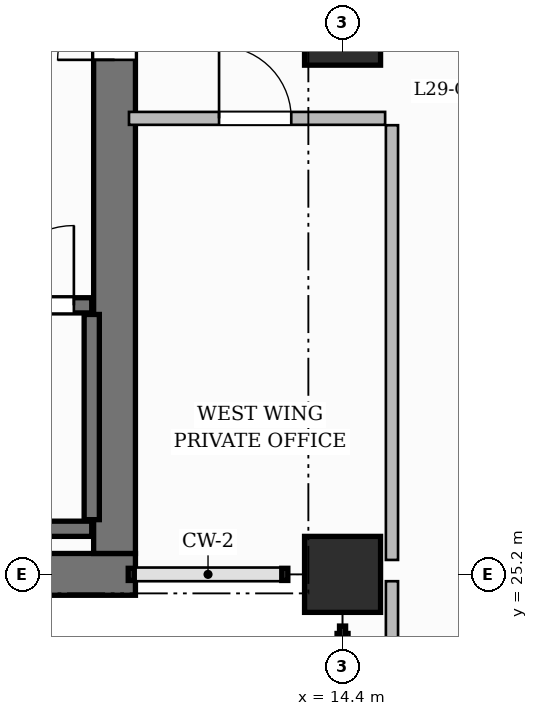
"""IFC4 building model, lengths in metres.
Left out: names, types, materials, properties, quantities, classifications, styles, units other than length and angle.
Written with IfcOpenShell. Run it as: python <this file> out.ifc"""

import sys

from ifc_helpers import new_model, si_unit, direction, frame, frame_2d, origin, origin_2d, place, context, subcontext, project, spatial, rectangle, extrude, source, transform, mapped, element, fill, save


model = new_model("IFC4")
c1 = context("Model", 3, precision=1e-05, world=origin(), true_north=direction((0.0, 1.0)))
c2 = subcontext(c1, "Body", "Model", "MODEL_VIEW")
j1 = project(units=[si_unit("LENGTHUNIT", "METRE"), si_unit("PLANEANGLEUNIT", "RADIAN")], contexts=[c1])
p1 = place(None, origin())
s1 = spatial("IfcSite", under=j1, at=p1, CompositionType="ELEMENT")
p2 = place(p1, origin())
s2 = spatial("IfcBuilding", under=s1, at=p2, CompositionType="ELEMENT")
p3 = place(p2, frame((0.0, 0.0, 119.2)))
s3 = spatial("IfcBuildingStorey", under=s2, at=p3, CompositionType="ELEMENT", Elevation=119.2)
p4 = place(p3, frame((3.325, 25.2, 0.0), z_axis=(0.0, 0.0, 1.0), x_axis=(1.0, 0.0, 0.0)))
e1 = element("IfcWall", 1, at=p4, inside=s3, PredefinedType="SHEAR", context=c2, shape_type="SweptSolid", body=[
    extrude(rectangle(XDim=8.35, YDim=0.55, at=frame_2d((4.175, 0.0))), origin(), (0.0, 0.0, 1.0), 3.7),
])
p5 = place(p3, frame((11.4, 25.475, 0.0), z_axis=(0.0, 0.0, 1.0), x_axis=(0.0, 1.0, 0.0)))
e2 = element("IfcWall", 2, at=p5, inside=s3, PredefinedType="SHEAR", context=c2, shape_type="SweptSolid", body=[
    extrude(rectangle(XDim=13.85, YDim=0.55, at=frame_2d((6.925, 0.0))), origin(), (0.0, 0.0, 1.0), 3.7),
])
p6 = place(p5, frame((6.495, 0.0, 0.0)))
e3 = element("IfcOpeningElement", 3, at=p6, cuts=e2, PredefinedType="OPENING", context=c2, shape_type="SweptSolid", body=[
    extrude(rectangle(XDim=1.5, YDim=2.2, at=frame_2d((0.75, 1.1))), frame((0.0, 0.285, 0.0), z_axis=(0.0, -1.0, 0.0), x_axis=(1.0, 0.0, 0.0)), (0.0, 0.0, 1.0), 0.57),
])
m1 = source(origin(), c2, "Body", "SweptSolid", [
    extrude(rectangle(XDim=1.0, YDim=1.0, at=origin_2d()), origin(), (0.0, 0.0, 1.0), 3.7),
])
for number, where, z_axis, x_axis in (
    (4, (14.4, 25.2, 0.0), (0.0, 0.0, 1.0), (1.0, 0.0, 0.0)),
    (5, (14.4, 32.4, 0.0), (0.0, 0.0, 1.0), (1.0, 0.0, 0.0)),
):
    element("IfcColumn", number, at=place(p3, frame(where, z_axis=z_axis, x_axis=x_axis)), inside=s3, PredefinedType="COLUMN", context=c2, shape_type="MappedRepresentation", body=[
        mapped(m1, transform((0.0, 0.0, 0.0), scale=1.0)),
    ])
p7 = place(p3, frame((4.0, 25.8, 0.0), z_axis=(0.0, 0.0, 1.0), x_axis=(1.0, 0.0, 0.0)))
e6 = element("IfcWall", 6, at=p7, inside=s3, PredefinedType="SHEAR", context=c2, shape_type="SweptSolid", body=[
    extrude(rectangle(XDim=7.1, YDim=0.2, at=frame_2d((3.55, 0.0))), origin(), (0.0, 0.0, 1.0), 3.7),
])
p8 = place(p3, frame((11.1, 25.92, 0.0), z_axis=(0.0, 0.0, 1.0), x_axis=(0.0, 1.0, 0.0)))
e7 = element("IfcWall", 7, at=p8, inside=s3, PredefinedType="SHEAR", context=c2, shape_type="SweptSolid", body=[
    extrude(rectangle(XDim=2.7, YDim=0.2, at=frame_2d((1.35, 0.0))), origin(), (0.0, 0.0, 1.0), 3.7),
])
p9 = place(p3, frame((4.0, 28.74, 0.0), z_axis=(0.0, 0.0, 1.0), x_axis=(1.0, 0.0, 0.0)))
e8 = element("IfcWall", 8, at=p9, inside=s3, PredefinedType="SHEAR", context=c2, shape_type="SweptSolid", body=[
    extrude(rectangle(XDim=7.1, YDim=0.2, at=frame_2d((3.55, 0.0))), origin(), (0.0, 0.0, 1.0), 3.7),
])
p10 = place(p9, frame((5.815, 0.0, 0.0)))
e9 = element("IfcOpeningElement", 9, at=p10, cuts=e8, PredefinedType="OPENING", context=c2, shape_type="SweptSolid", body=[
    extrude(rectangle(XDim=1.05, YDim=2.2, at=frame_2d((0.525, 1.1))), frame((0.0, 0.11, 0.0), z_axis=(0.0, -1.0, 0.0), x_axis=(1.0, 0.0, 0.0)), (0.0, 0.0, 1.0), 0.22),
])
p11 = place(p3, frame((15.05, 12.36, 0.0), z_axis=(0.0, 0.0, 1.0), x_axis=(0.0, 1.0, 0.0)))
e10 = element("IfcWall", 10, at=p11, inside=s3, PredefinedType="PARTITIONING", context=c2, shape_type="SweptSolid", body=[
    extrude(rectangle(XDim=12.75, YDim=0.16, at=frame_2d((6.375, 0.0))), origin(), (0.0, 0.0, 1.0), 3.45),
])
p12 = place(p3, frame((15.05, 25.39, 0.0), z_axis=(0.0, 0.0, 1.0), x_axis=(0.0, 1.0, 0.0)))
e11 = element("IfcWall", 11, at=p12, inside=s3, PredefinedType="PARTITIONING", context=c2, shape_type="SweptSolid", body=[
    extrude(rectangle(XDim=5.72, YDim=0.16, at=frame_2d((2.86, 0.0))), origin(), (0.0, 0.0, 1.0), 3.45),
])
p13 = place(p3, frame((11.59, 31.2, 0.0), z_axis=(0.0, 0.0, 1.0), x_axis=(1.0, 0.0, 0.0)))
e12 = element("IfcWall", 12, at=p13, inside=s3, PredefinedType="PARTITIONING", context=c2, shape_type="SweptSolid", body=[
    extrude(rectangle(XDim=3.37, YDim=0.17, at=frame_2d((1.685, 0.0))), origin(), (0.0, 0.0, 1.0), 3.45),
])
p14 = place(p13, frame((1.185, 0.0, 0.0)))
e13 = element("IfcOpeningElement", 13, at=p14, cuts=e12, PredefinedType="OPENING", context=c2, shape_type="SweptSolid", body=[
    extrude(rectangle(XDim=0.95, YDim=2.15, at=frame_2d((0.475, 1.075))), frame((0.0, 0.095, 0.0), z_axis=(0.0, -1.0, 0.0), x_axis=(1.0, 0.0, 0.0)), (0.0, 0.0, 1.0), 0.19),
])
m2 = source(origin(), c2, "Body", "SweptSolid", [
    extrude(rectangle(XDim=1.05, YDim=2.2, at=frame_2d((0.525, 1.1))), frame((0.0, 0.025, 0.0), z_axis=(0.0, -1.0, 0.0), x_axis=(1.0, 0.0, 0.0)), (0.0, 0.0, 1.0), 0.05),
])
p15 = place(p10, origin())
e14 = element("IfcDoor", 14, at=p15, inside=s3, OperationType="SINGLE_SWING_RIGHT", PredefinedType="DOOR", context=c2, shape_type="MappedRepresentation", body=[
    mapped(m2, transform((0.0, 0.0, 0.0), scale=1.0)),
])
fill(e9, e14)
m3 = source(origin(), c2, "Body", "SweptSolid", [
    extrude(rectangle(XDim=1.5, YDim=2.2, at=frame_2d((0.75, 1.1))), frame((0.0, 0.025, 0.0), z_axis=(0.0, -1.0, 0.0), x_axis=(1.0, 0.0, 0.0)), (0.0, 0.0, 1.0), 0.05),
])
p16 = place(p6, origin())
e15 = element("IfcDoor", 15, at=p16, inside=s3, OperationType="DOUBLE_DOOR_SINGLE_SWING", PredefinedType="DOOR", context=c2, shape_type="MappedRepresentation", body=[
    mapped(m3, transform((0.0, 0.0, 0.0), scale=1.0)),
])
fill(e3, e15)
m4 = source(origin(), c2, "Body", "SweptSolid", [
    extrude(rectangle(XDim=0.95, YDim=2.15, at=frame_2d((0.475, 1.075))), frame((0.0, 0.025, 0.0), z_axis=(0.0, -1.0, 0.0), x_axis=(1.0, 0.0, 0.0)), (0.0, 0.0, 1.0), 0.05),
])
p17 = place(p14, origin())
e16 = element("IfcDoor", 16, at=p17, inside=s3, OperationType="SINGLE_SWING_LEFT", PredefinedType="DOOR", context=c2, shape_type="MappedRepresentation", body=[
    mapped(m4, transform((0.0, 0.0, 0.0), scale=1.0)),
])
fill(e13, e16)
save(model, sys.argv[1])
